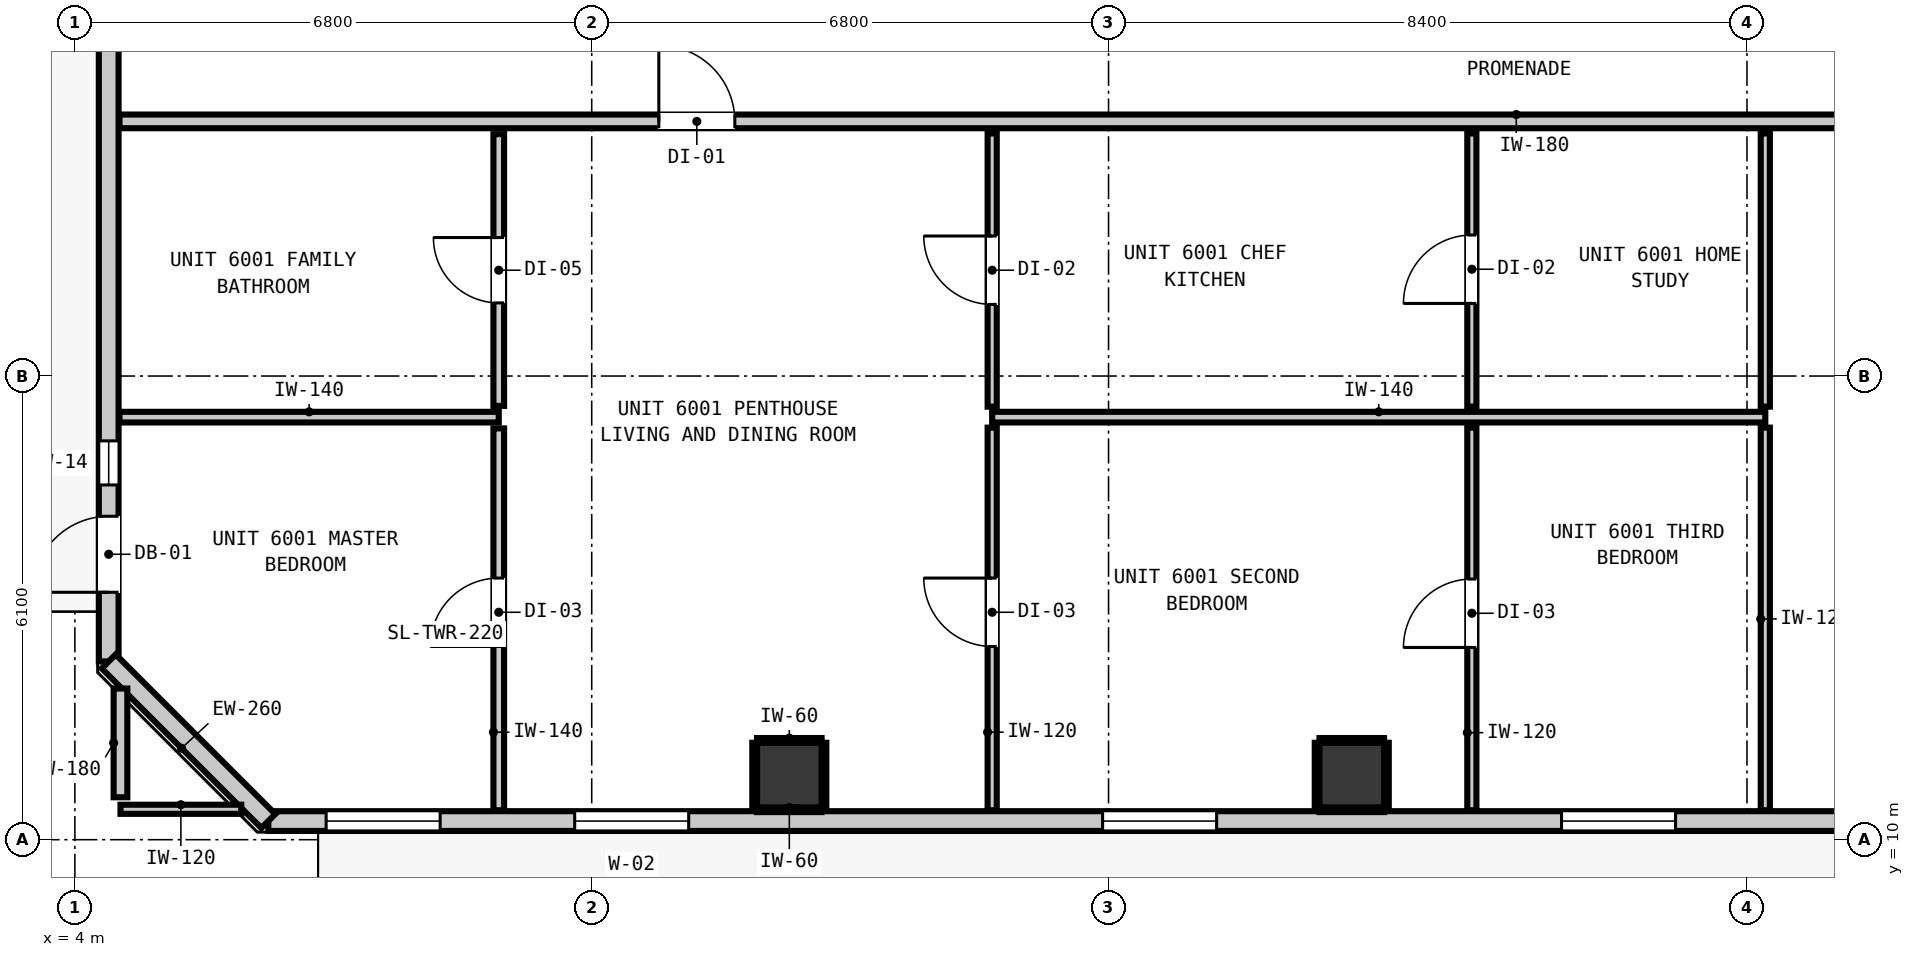
"""IFC4 building model, lengths in metres.
Left out: names, types, materials, properties, quantities, classifications, styles, units other than length and angle.
Written with IfcOpenShell. Run it as: python <this file> out.ifc"""

import sys

from ifc_helpers import new_model, si_unit, direction, frame, frame_2d, origin, origin_2d, place, context, subcontext, project, spatial, rectangle, extrude, element, fill, save


model = new_model("IFC4")
c1 = context("Model", 3, precision=1e-05, world=origin(), true_north=direction((0.0, 1.0)))
c2 = subcontext(c1, "Body", "Model", "MODEL_VIEW")
j1 = project(units=[si_unit("LENGTHUNIT", "METRE"), si_unit("PLANEANGLEUNIT", "RADIAN")], contexts=[c1])
p1 = place(None, origin())
s1 = spatial("IfcSite", under=j1, at=p1, CompositionType="ELEMENT")
p2 = place(p1, origin())
s2 = spatial("IfcBuilding", under=s1, at=p2, CompositionType="ELEMENT")
p3 = place(p2, frame((0.0, 0.0, 206.76)))
s3 = spatial("IfcBuildingStorey", under=s2, at=p3, CompositionType="ELEMENT", Elevation=206.76)
for number, where, z_axis, x_axis in (
    (1, (13.4, 10.85, 0.0), (0.0, 0.0, 1.0), (1.0, 0.0, 0.0)),
    (2, (20.8, 10.85, 0.0), (0.0, 0.0, 1.0), (1.0, 0.0, 0.0)),
):
    element("IfcColumn", number, at=place(p3, frame(where, z_axis=z_axis, x_axis=x_axis)), inside=s3, PredefinedType="COLUMN", context=c2, shape_type="SweptSolid", body=[
        extrude(rectangle(XDim=0.85, YDim=0.85, at=origin_2d()), origin(), (0.0, 0.0, 1.0), 2.9),
    ])
p4 = place(p3, frame((4.445, 12.345, 0.0), z_axis=(0.0, 0.0, 1.0), x_axis=(0.0, 1.0, 0.0)))
e3 = element("IfcWall", 3, at=p4, inside=s3, PredefinedType="STANDARD", context=c2, shape_type="SweptSolid", body=[
    extrude(rectangle(XDim=30.31, YDim=0.26, at=frame_2d((15.155, 0.0))), origin(), (0.0, 0.0, 1.0), 2.9),
])
p5 = place(p4, frame((0.91, 0.0, 0.0)))
e4 = element("IfcOpeningElement", 4, at=p5, cuts=e3, PredefinedType="OPENING", context=c2, shape_type="SweptSolid", body=[
    extrude(rectangle(XDim=1.0, YDim=2.15, at=frame_2d((0.5, 1.075))), frame((0.0, 0.14, 0.0), z_axis=(0.0, -1.0, 0.0), x_axis=(1.0, 0.0, 0.0)), (0.0, 0.0, 1.0), 0.28),
])
p6 = place(p4, frame((2.322, 0.0, 0.85)))
e5 = element("IfcOpeningElement", 5, at=p6, cuts=e3, PredefinedType="OPENING", context=c2, shape_type="SweptSolid", body=[
    extrude(rectangle(XDim=0.58, YDim=1.5, at=frame_2d((0.29, 0.75))), frame((0.0, 0.14, 0.0), z_axis=(0.0, -1.0, 0.0), x_axis=(1.0, 0.0, 0.0)), (0.0, 0.0, 1.0), 0.28),
])
p7 = place(p4, frame((13.255, 0.0, 0.85)))
e6 = element("IfcOpeningElement", 6, at=p7, cuts=e3, PredefinedType="OPENING", context=c2, shape_type="SweptSolid", body=[
    extrude(rectangle(XDim=1.5, YDim=1.8, at=frame_2d((0.75, 0.9))), frame((0.0, 0.14, 0.0), z_axis=(0.0, -1.0, 0.0), x_axis=(1.0, 0.0, 0.0)), (0.0, 0.0, 1.0), 0.28),
])
p8 = place(p3, frame((39.255, 10.245, 0.0), z_axis=(0.0, 0.0, 1.0), x_axis=(-1.0, 0.0, 0.0)))
e7 = element("IfcWall", 7, at=p8, inside=s3, PredefinedType="STANDARD", context=c2, shape_type="SweptSolid", body=[
    extrude(rectangle(XDim=32.71, YDim=0.26, at=frame_2d((16.355, 0.0))), origin(), (0.0, 0.0, 1.0), 2.9),
])
p9 = place(p8, frame((0.907, 0.0, 0.0)))
e8 = element("IfcOpeningElement", 8, at=p9, cuts=e7, PredefinedType="OPENING", context=c2, shape_type="SweptSolid", body=[
    extrude(rectangle(XDim=1.0, YDim=2.15, at=frame_2d((0.5, 1.075))), frame((0.0, 0.14, 0.0), z_axis=(0.0, -1.0, 0.0), x_axis=(1.0, 0.0, 0.0)), (0.0, 0.0, 1.0), 0.28),
])
p10 = place(p8, frame((27.179, 0.0, 0.85)))
e9 = element("IfcOpeningElement", 9, at=p10, cuts=e7, PredefinedType="OPENING", context=c2, shape_type="SweptSolid", body=[
    extrude(rectangle(XDim=1.5, YDim=1.8, at=frame_2d((0.75, 0.9))), frame((0.0, 0.14, 0.0), z_axis=(0.0, -1.0, 0.0), x_axis=(1.0, 0.0, 0.0)), (0.0, 0.0, 1.0), 0.28),
])
p11 = place(p8, frame((30.449, 0.0, 0.85)))
e10 = element("IfcOpeningElement", 10, at=p11, cuts=e7, PredefinedType="OPENING", context=c2, shape_type="SweptSolid", body=[
    extrude(rectangle(XDim=1.5, YDim=1.8, at=frame_2d((0.75, 0.9))), frame((0.0, 0.14, 0.0), z_axis=(0.0, -1.0, 0.0), x_axis=(1.0, 0.0, 0.0)), (0.0, 0.0, 1.0), 0.28),
])
p12 = place(p8, frame((20.233, 0.0, 0.85)))
e11 = element("IfcOpeningElement", 11, at=p12, cuts=e7, PredefinedType="OPENING", context=c2, shape_type="SweptSolid", body=[
    extrude(rectangle(XDim=1.5, YDim=1.8, at=frame_2d((0.75, 0.9))), frame((0.0, 0.14, 0.0), z_axis=(0.0, -1.0, 0.0), x_axis=(1.0, 0.0, 0.0)), (0.0, 0.0, 1.0), 0.28),
])
p13 = place(p8, frame((14.195, 0.0, 0.85)))
e12 = element("IfcOpeningElement", 12, at=p13, cuts=e7, PredefinedType="OPENING", context=c2, shape_type="SweptSolid", body=[
    extrude(rectangle(XDim=1.5, YDim=1.8, at=frame_2d((0.75, 0.9))), frame((0.0, 0.14, 0.0), z_axis=(0.0, -1.0, 0.0), x_axis=(1.0, 0.0, 0.0)), (0.0, 0.0, 1.0), 0.28),
])
p14 = place(p8, frame((5.655, 0.0, 0.85)))
e13 = element("IfcOpeningElement", 13, at=p14, cuts=e7, PredefinedType="OPENING", context=c2, shape_type="SweptSolid", body=[
    extrude(rectangle(XDim=1.5, YDim=1.8, at=frame_2d((0.75, 0.9))), frame((0.0, 0.14, 0.0), z_axis=(0.0, -1.0, 0.0), x_axis=(1.0, 0.0, 0.0)), (0.0, 0.0, 1.0), 0.28),
])
p15 = place(p3, frame((6.545, 10.245, 0.0), z_axis=(0.0, 0.0, 1.0), x_axis=(-0.707106781187, 0.707106781187, 0.0)))
e14 = element("IfcWall", 14, at=p15, inside=s3, PredefinedType="STANDARD", context=c2, shape_type="SweptSolid", body=[
    extrude(rectangle(XDim=2.97, YDim=0.26, at=frame_2d((1.485, 0.0))), origin(), (0.0, 0.0, 1.0), 2.9),
])
p16 = place(p3, frame((4.587, 19.45, 0.0), z_axis=(0.0, 0.0, 1.0), x_axis=(1.0, 0.0, 0.0)))
e15 = element("IfcWall", 15, at=p16, inside=s3, PredefinedType="PARTITIONING", context=c2, shape_type="SweptSolid", body=[
    extrude(rectangle(XDim=36.626, YDim=0.18, at=frame_2d((18.313, 0.0))), origin(), (0.0, 0.0, 1.0), 2.9),
])
p17 = place(p16, frame((7.096, 0.0, 0.0)))
e16 = element("IfcOpeningElement", 16, at=p17, cuts=e15, PredefinedType="OPENING", context=c2, shape_type="SweptSolid", body=[
    extrude(rectangle(XDim=1.0, YDim=2.15, at=frame_2d((0.5, 1.075))), frame((0.0, 0.1, 0.0), z_axis=(0.0, -1.0, 0.0), x_axis=(1.0, 0.0, 0.0)), (0.0, 0.0, 1.0), 0.2),
])
p18 = place(p16, frame((28.659, 0.0, 0.0)))
e17 = element("IfcOpeningElement", 17, at=p18, cuts=e15, PredefinedType="OPENING", context=c2, shape_type="SweptSolid", body=[
    extrude(rectangle(XDim=0.9, YDim=2.1, at=frame_2d((0.45, 1.05))), frame((0.0, 0.1, 0.0), z_axis=(0.0, -1.0, 0.0), x_axis=(1.0, 0.0, 0.0)), (0.0, 0.0, 1.0), 0.2),
])
p19 = place(p3, frame((4.587, 15.559, 0.0), z_axis=(0.0, 0.0, 1.0), x_axis=(1.0, 0.0, 0.0)))
e18 = element("IfcWall", 18, at=p19, inside=s3, PredefinedType="PARTITIONING", context=c2, shape_type="SweptSolid", body=[
    extrude(rectangle(XDim=4.99, YDim=0.14, at=frame_2d((2.495, 0.0))), origin(), (0.0, 0.0, 1.0), 2.9),
])
p20 = place(p3, frame((16.069, 15.559, 0.0), z_axis=(0.0, 0.0, 1.0), x_axis=(1.0, 0.0, 0.0)))
e19 = element("IfcWall", 19, at=p20, inside=s3, PredefinedType="PARTITIONING", context=c2, shape_type="SweptSolid", body=[
    extrude(rectangle(XDim=10.172, YDim=0.14, at=frame_2d((5.086, 0.0))), origin(), (0.0, 0.0, 1.0), 2.9),
])
p21 = place(p3, frame((4.6, 10.4, 0.0), z_axis=(0.0, 0.0, 1.0), x_axis=(1.0, 0.0, 0.0)))
e20 = element("IfcWall", 20, at=p21, inside=s3, PredefinedType="PARTITIONING", context=c2, shape_type="SweptSolid", body=[
    extrude(rectangle(XDim=1.589, YDim=0.12, at=frame_2d((0.794, 0.0))), origin(), (0.0, 0.0, 1.0), 2.9),
])
p22 = place(p3, frame((4.6, 10.558, 0.0), z_axis=(0.0, 0.0, 1.0), x_axis=(0.0, 1.0, 0.0)))
e21 = element("IfcWall", 21, at=p22, inside=s3, PredefinedType="PARTITIONING", context=c2, shape_type="SweptSolid", body=[
    extrude(rectangle(XDim=1.431, YDim=0.18, at=frame_2d((0.715, 0.0))), origin(), (0.0, 0.0, 1.0), 2.9),
])
p23 = place(p3, frame((9.577, 10.387, 0.0), z_axis=(0.0, 0.0, 1.0), x_axis=(0.0, 1.0, 0.0)))
e22 = element("IfcWall", 22, at=p23, inside=s3, PredefinedType="PARTITIONING", context=c2, shape_type="SweptSolid", body=[
    extrude(rectangle(XDim=5.024, YDim=0.14, at=frame_2d((2.512, 0.0))), origin(), (0.0, 0.0, 1.0), 2.9),
])
p24 = place(p23, frame((2.155, 0.0, 0.0)))
e23 = element("IfcOpeningElement", 23, at=p24, cuts=e22, PredefinedType="OPENING", context=c2, shape_type="SweptSolid", body=[
    extrude(rectangle(XDim=0.9, YDim=2.1, at=frame_2d((0.45, 1.05))), frame((0.0, 0.08, 0.0), z_axis=(0.0, -1.0, 0.0), x_axis=(1.0, 0.0, 0.0)), (0.0, 0.0, 1.0), 0.16),
])
p25 = place(p3, frame((9.577, 15.707, 0.0), z_axis=(0.0, 0.0, 1.0), x_axis=(0.0, 1.0, 0.0)))
e24 = element("IfcWall", 24, at=p25, inside=s3, PredefinedType="PARTITIONING", context=c2, shape_type="SweptSolid", body=[
    extrude(rectangle(XDim=3.575, YDim=0.14, at=frame_2d((1.788, 0.0))), origin(), (0.0, 0.0, 1.0), 2.9),
])
p26 = place(p25, frame((1.355, 0.0, 0.0)))
e25 = element("IfcOpeningElement", 25, at=p26, cuts=e24, PredefinedType="OPENING", context=c2, shape_type="SweptSolid", body=[
    extrude(rectangle(XDim=0.86, YDim=2.02, at=frame_2d((0.43, 1.01))), frame((0.0, 0.08, 0.0), z_axis=(0.0, -1.0, 0.0), x_axis=(1.0, 0.0, 0.0)), (0.0, 0.0, 1.0), 0.16),
])
p27 = place(p3, frame((16.069, 10.387, 0.0), z_axis=(0.0, 0.0, 1.0), x_axis=(0.0, 1.0, 0.0)))
e26 = element("IfcWall", 26, at=p27, inside=s3, PredefinedType="PARTITIONING", context=c2, shape_type="SweptSolid", body=[
    extrude(rectangle(XDim=5.034, YDim=0.12, at=frame_2d((2.517, 0.0))), origin(), (0.0, 0.0, 1.0), 2.9),
])
p28 = place(p27, frame((2.155, 0.0, 0.0)))
e27 = element("IfcOpeningElement", 27, at=p28, cuts=e26, PredefinedType="OPENING", context=c2, shape_type="SweptSolid", body=[
    extrude(rectangle(XDim=0.9, YDim=2.1, at=frame_2d((0.45, 1.05))), frame((0.0, 0.07, 0.0), z_axis=(0.0, -1.0, 0.0), x_axis=(1.0, 0.0, 0.0)), (0.0, 0.0, 1.0), 0.14),
])
p29 = place(p3, frame((16.069, 15.697, 0.0), z_axis=(0.0, 0.0, 1.0), x_axis=(0.0, 1.0, 0.0)))
e28 = element("IfcWall", 28, at=p29, inside=s3, PredefinedType="PARTITIONING", context=c2, shape_type="SweptSolid", body=[
    extrude(rectangle(XDim=3.595, YDim=0.12, at=frame_2d((1.797, 0.0))), origin(), (0.0, 0.0, 1.0), 2.9),
])
p30 = place(p29, frame((1.345, 0.0, 0.0)))
e29 = element("IfcOpeningElement", 29, at=p30, cuts=e28, PredefinedType="OPENING", context=c2, shape_type="SweptSolid", body=[
    extrude(rectangle(XDim=0.9, YDim=2.1, at=frame_2d((0.45, 1.05))), frame((0.0, 0.07, 0.0), z_axis=(0.0, -1.0, 0.0), x_axis=(1.0, 0.0, 0.0)), (0.0, 0.0, 1.0), 0.14),
])
p31 = place(p3, frame((22.38, 10.387, 0.0), z_axis=(0.0, 0.0, 1.0), x_axis=(0.0, 1.0, 0.0)))
e30 = element("IfcWall", 30, at=p31, inside=s3, PredefinedType="PARTITIONING", context=c2, shape_type="SweptSolid", body=[
    extrude(rectangle(XDim=5.034, YDim=0.12, at=frame_2d((2.517, 0.0))), origin(), (0.0, 0.0, 1.0), 2.9),
])
p32 = place(p31, frame((2.142, 0.0, 0.0)))
e31 = element("IfcOpeningElement", 31, at=p32, cuts=e30, PredefinedType="OPENING", context=c2, shape_type="SweptSolid", body=[
    extrude(rectangle(XDim=0.9, YDim=2.1, at=frame_2d((0.45, 1.05))), frame((0.0, 0.07, 0.0), z_axis=(0.0, -1.0, 0.0), x_axis=(1.0, 0.0, 0.0)), (0.0, 0.0, 1.0), 0.14),
])
p33 = place(p3, frame((22.38, 15.697, 0.0), z_axis=(0.0, 0.0, 1.0), x_axis=(0.0, 1.0, 0.0)))
e32 = element("IfcWall", 32, at=p33, inside=s3, PredefinedType="PARTITIONING", context=c2, shape_type="SweptSolid", body=[
    extrude(rectangle(XDim=3.595, YDim=0.12, at=frame_2d((1.797, 0.0))), origin(), (0.0, 0.0, 1.0), 2.9),
])
p34 = place(p33, frame((1.358, 0.0, 0.0)))
e33 = element("IfcOpeningElement", 33, at=p34, cuts=e32, PredefinedType="OPENING", context=c2, shape_type="SweptSolid", body=[
    extrude(rectangle(XDim=0.9, YDim=2.1, at=frame_2d((0.45, 1.05))), frame((0.0, 0.07, 0.0), z_axis=(0.0, -1.0, 0.0), x_axis=(1.0, 0.0, 0.0)), (0.0, 0.0, 1.0), 0.14),
])
p35 = place(p3, frame((26.241, 10.387, 0.0), z_axis=(0.0, 0.0, 1.0), x_axis=(0.0, 1.0, 0.0)))
e34 = element("IfcWall", 34, at=p35, inside=s3, PredefinedType="PARTITIONING", context=c2, shape_type="SweptSolid", body=[
    extrude(rectangle(XDim=5.034, YDim=0.12, at=frame_2d((2.517, 0.0))), origin(), (0.0, 0.0, 1.0), 2.9),
])
p36 = place(p3, frame((26.241, 15.697, 0.0), z_axis=(0.0, 0.0, 1.0), x_axis=(0.0, 1.0, 0.0)))
e35 = element("IfcWall", 35, at=p36, inside=s3, PredefinedType="PARTITIONING", context=c2, shape_type="SweptSolid", body=[
    extrude(rectangle(XDim=3.595, YDim=0.12, at=frame_2d((1.797, 0.0))), origin(), (0.0, 0.0, 1.0), 2.9),
])
for number, where, z_axis, x_axis in (
    (36, (12.975, 10.393, 0.0), (0.0, 0.0, 1.0), (1.0, 0.0, 0.0)),
    (37, (12.975, 11.307, 0.0), (0.0, 0.0, 1.0), (1.0, 0.0, 0.0)),
):
    element("IfcWall", number, at=place(p3, frame(where, z_axis=z_axis, x_axis=x_axis)), inside=s3, PredefinedType="PARTITIONING", context=c2, shape_type="SweptSolid", body=[
        extrude(rectangle(XDim=0.85, YDim=0.06, at=frame_2d((0.425, 0.0))), origin(), (0.0, 0.0, 1.0), 1.45),
    ])
for number, where, z_axis, x_axis in (
    (38, (12.943, 10.425, 0.0), (0.0, 0.0, 1.0), (0.0, 1.0, 0.0)),
    (39, (13.857, 10.425, 0.0), (0.0, 0.0, 1.0), (0.0, 1.0, 0.0)),
):
    element("IfcWall", number, at=place(p3, frame(where, z_axis=z_axis, x_axis=x_axis)), inside=s3, PredefinedType="PARTITIONING", context=c2, shape_type="SweptSolid", body=[
        extrude(rectangle(XDim=0.85, YDim=0.06, at=frame_2d((0.425, 0.0))), origin(), (0.0, 0.0, 1.0), 0.905),
    ])
for number, where, z_axis, x_axis in (
    (40, (20.375, 10.393, 0.0), (0.0, 0.0, 1.0), (1.0, 0.0, 0.0)),
    (41, (20.375, 11.307, 0.0), (0.0, 0.0, 1.0), (1.0, 0.0, 0.0)),
):
    element("IfcWall", number, at=place(p3, frame(where, z_axis=z_axis, x_axis=x_axis)), inside=s3, PredefinedType="PARTITIONING", context=c2, shape_type="SweptSolid", body=[
        extrude(rectangle(XDim=0.85, YDim=0.06, at=frame_2d((0.425, 0.0))), origin(), (0.0, 0.0, 1.0), 1.45),
    ])
for number, where, z_axis, x_axis in (
    (42, (20.343, 10.425, 0.0), (0.0, 0.0, 1.0), (0.0, 1.0, 0.0)),
    (43, (21.257, 10.425, 0.0), (0.0, 0.0, 1.0), (0.0, 1.0, 0.0)),
):
    element("IfcWall", number, at=place(p3, frame(where, z_axis=z_axis, x_axis=x_axis)), inside=s3, PredefinedType="PARTITIONING", context=c2, shape_type="SweptSolid", body=[
        extrude(rectangle(XDim=0.85, YDim=0.06, at=frame_2d((0.425, 0.0))), origin(), (0.0, 0.0, 1.0), 0.905),
    ])
p37 = place(p5, origin())
e44 = element("IfcDoor", 44, at=p37, inside=s3, OperationType="SINGLE_SWING_LEFT", PredefinedType="DOOR", context=c2, shape_type="SweptSolid", body=[
    extrude(rectangle(XDim=1.0, YDim=2.15, at=frame_2d((0.5, 1.075))), frame((0.0, 0.025, 0.0), z_axis=(0.0, -1.0, 0.0), x_axis=(1.0, 0.0, 0.0)), (0.0, 0.0, 1.0), 0.05),
])
fill(e4, e44)
p38 = place(p6, origin())
e45 = element("IfcWindow", 45, at=p38, inside=s3, PartitioningType="SINGLE_PANEL", PredefinedType="WINDOW", context=c2, shape_type="SweptSolid", body=[
    extrude(rectangle(XDim=0.58, YDim=1.5, at=frame_2d((0.29, 0.75))), frame((0.0, 0.03, 0.0), z_axis=(0.0, -1.0, 0.0), x_axis=(1.0, 0.0, 0.0)), (0.0, 0.0, 1.0), 0.06),
])
fill(e5, e45)
p39 = place(p10, origin())
e46 = element("IfcWindow", 46, at=p39, inside=s3, PartitioningType="SINGLE_PANEL", PredefinedType="WINDOW", context=c2, shape_type="SweptSolid", body=[
    extrude(rectangle(XDim=1.5, YDim=1.8, at=frame_2d((0.75, 0.9))), frame((0.0, 0.03, 0.0), z_axis=(0.0, -1.0, 0.0), x_axis=(1.0, 0.0, 0.0)), (0.0, 0.0, 1.0), 0.06),
])
fill(e9, e46)
p40 = place(p11, origin())
e47 = element("IfcWindow", 47, at=p40, inside=s3, PartitioningType="SINGLE_PANEL", PredefinedType="WINDOW", context=c2, shape_type="SweptSolid", body=[
    extrude(rectangle(XDim=1.5, YDim=1.8, at=frame_2d((0.75, 0.9))), frame((0.0, 0.03, 0.0), z_axis=(0.0, -1.0, 0.0), x_axis=(1.0, 0.0, 0.0)), (0.0, 0.0, 1.0), 0.06),
])
fill(e10, e47)
p41 = place(p12, origin())
e48 = element("IfcWindow", 48, at=p41, inside=s3, PartitioningType="SINGLE_PANEL", PredefinedType="WINDOW", context=c2, shape_type="SweptSolid", body=[
    extrude(rectangle(XDim=1.5, YDim=1.8, at=frame_2d((0.75, 0.9))), frame((0.0, 0.03, 0.0), z_axis=(0.0, -1.0, 0.0), x_axis=(1.0, 0.0, 0.0)), (0.0, 0.0, 1.0), 0.06),
])
fill(e11, e48)
p42 = place(p13, origin())
e49 = element("IfcWindow", 49, at=p42, inside=s3, PartitioningType="SINGLE_PANEL", PredefinedType="WINDOW", context=c2, shape_type="SweptSolid", body=[
    extrude(rectangle(XDim=1.5, YDim=1.8, at=frame_2d((0.75, 0.9))), frame((0.0, 0.03, 0.0), z_axis=(0.0, -1.0, 0.0), x_axis=(1.0, 0.0, 0.0)), (0.0, 0.0, 1.0), 0.06),
])
fill(e12, e49)
p43 = place(p17, origin())
e50 = element("IfcDoor", 50, at=p43, inside=s3, OperationType="SINGLE_SWING_LEFT", PredefinedType="DOOR", context=c2, shape_type="SweptSolid", body=[
    extrude(rectangle(XDim=1.0, YDim=2.15, at=frame_2d((0.5, 1.075))), frame((0.0, 0.025, 0.0), z_axis=(0.0, -1.0, 0.0), x_axis=(1.0, 0.0, 0.0)), (0.0, 0.0, 1.0), 0.05),
])
fill(e16, e50)
p44 = place(p26, origin())
e51 = element("IfcDoor", 51, at=p44, inside=s3, OperationType="SINGLE_SWING_RIGHT", PredefinedType="DOOR", context=c2, shape_type="SweptSolid", body=[
    extrude(rectangle(XDim=0.86, YDim=2.02, at=frame_2d((0.43, 1.01))), frame((0.0, 0.025, 0.0), z_axis=(0.0, -1.0, 0.0), x_axis=(1.0, 0.0, 0.0)), (0.0, 0.0, 1.0), 0.05),
])
fill(e25, e51)
p45 = place(p24, origin())
e52 = element("IfcDoor", 52, at=p45, inside=s3, OperationType="SINGLE_SWING_LEFT", PredefinedType="DOOR", context=c2, shape_type="SweptSolid", body=[
    extrude(rectangle(XDim=0.9, YDim=2.1, at=frame_2d((0.45, 1.05))), frame((0.0, 0.025, 0.0), z_axis=(0.0, -1.0, 0.0), x_axis=(1.0, 0.0, 0.0)), (0.0, 0.0, 1.0), 0.05),
])
fill(e23, e52)
p46 = place(p30, origin())
e53 = element("IfcDoor", 53, at=p46, inside=s3, OperationType="SINGLE_SWING_RIGHT", PredefinedType="DOOR", context=c2, shape_type="SweptSolid", body=[
    extrude(rectangle(XDim=0.9, YDim=2.1, at=frame_2d((0.45, 1.05))), frame((0.0, 0.025, 0.0), z_axis=(0.0, -1.0, 0.0), x_axis=(1.0, 0.0, 0.0)), (0.0, 0.0, 1.0), 0.05),
])
fill(e29, e53)
p47 = place(p34, origin())
e54 = element("IfcDoor", 54, at=p47, inside=s3, OperationType="SINGLE_SWING_LEFT", PredefinedType="DOOR", context=c2, shape_type="SweptSolid", body=[
    extrude(rectangle(XDim=0.9, YDim=2.1, at=frame_2d((0.45, 1.05))), frame((0.0, 0.025, 0.0), z_axis=(0.0, -1.0, 0.0), x_axis=(1.0, 0.0, 0.0)), (0.0, 0.0, 1.0), 0.05),
])
fill(e33, e54)
p48 = place(p28, origin())
e55 = element("IfcDoor", 55, at=p48, inside=s3, OperationType="SINGLE_SWING_RIGHT", PredefinedType="DOOR", context=c2, shape_type="SweptSolid", body=[
    extrude(rectangle(XDim=0.9, YDim=2.1, at=frame_2d((0.45, 1.05))), frame((0.0, 0.025, 0.0), z_axis=(0.0, -1.0, 0.0), x_axis=(1.0, 0.0, 0.0)), (0.0, 0.0, 1.0), 0.05),
])
fill(e27, e55)
p49 = place(p32, origin())
e56 = element("IfcDoor", 56, at=p49, inside=s3, OperationType="SINGLE_SWING_LEFT", PredefinedType="DOOR", context=c2, shape_type="SweptSolid", body=[
    extrude(rectangle(XDim=0.9, YDim=2.1, at=frame_2d((0.45, 1.05))), frame((0.0, 0.025, 0.0), z_axis=(0.0, -1.0, 0.0), x_axis=(1.0, 0.0, 0.0)), (0.0, 0.0, 1.0), 0.05),
])
fill(e31, e56)
save(model, sys.argv[1])
